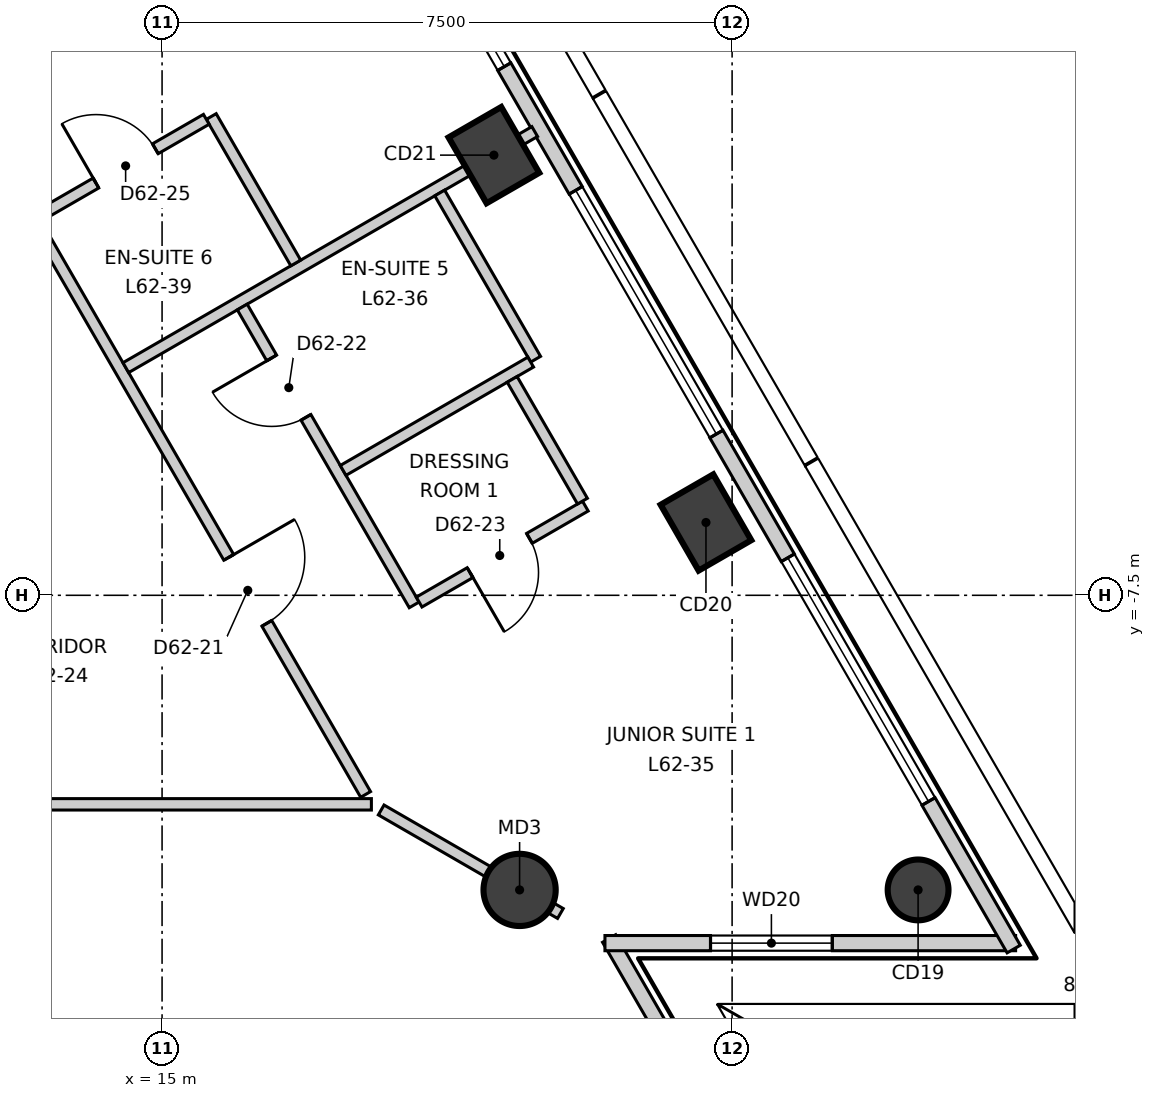
"""IFC4 building model, lengths in metres.
Left out: names, types, materials, properties, quantities, classifications, styles, units other than length and angle.
Written with IfcOpenShell. Run it as: python <this file> out.ifc"""

import sys

from ifc_helpers import new_model, si_unit, direction, frame, frame_2d, origin, origin_2d, place, context, subcontext, project, spatial, rectangle, circle, extrude, element, fill, save


model = new_model("IFC4")
c1 = context("Model", 3, precision=1e-05, world=origin(), true_north=direction((0.0, 1.0)))
c2 = subcontext(c1, "Body", "Model", "MODEL_VIEW")
j1 = project(units=[si_unit("LENGTHUNIT", "METRE"), si_unit("PLANEANGLEUNIT", "RADIAN")], contexts=[c1])
p1 = place(None, origin())
s1 = spatial("IfcSite", under=j1, at=p1, CompositionType="ELEMENT")
p2 = place(p1, origin())
s2 = spatial("IfcBuilding", under=s1, at=p2, CompositionType="ELEMENT")
p3 = place(p2, frame((0.0, 0.0, 268.3)))
s3 = spatial("IfcBuildingStorey", under=s2, at=p3, CompositionType="ELEMENT", Elevation=268.3)
p4 = place(p3, frame((24.947, -11.376, -0.3), z_axis=(0.0, 0.0, 1.0), x_axis=(-0.5, 0.866025403784, 0.0)))
e1 = element("IfcColumn", 1, at=p4, inside=s3, PredefinedType="COLUMN", context=c2, shape_type="SweptSolid", body=[
    extrude(circle(Radius=0.4, at=origin_2d()), origin(), (0.0, 0.0, 1.0), 3.6),
])
for number, where, z_axis, x_axis in (
    (2, (22.156, -6.542, -0.3), (0.0, 0.0, 1.0), (-0.5, 0.866, 0.0)),
    (3, (19.366, -1.709, -0.3), (0.0, 0.0, 1.0), (-0.5, 0.866, 0.0)),
):
    element("IfcColumn", number, at=place(p3, frame(where, z_axis=z_axis, x_axis=x_axis)), inside=s3, PredefinedType="COLUMN", context=c2, shape_type="SweptSolid", body=[
        extrude(rectangle(XDim=1.0, YDim=0.8, at=origin_2d()), origin(), (0.0, 0.0, 1.0), 3.6),
    ])
p5 = place(p3, frame((19.704, -11.376, -0.3), z_axis=(0.0, 0.0, 1.0), x_axis=(1.0, 0.0, 0.0)))
e4 = element("IfcColumn", 4, at=p5, inside=s3, PredefinedType="COLUMN", context=c2, shape_type="SweptSolid", body=[
    extrude(circle(Radius=0.475, at=origin_2d()), origin(), (0.0, 0.0, 1.0), 3.6),
])
p6 = place(p3, frame((23.584, -16.695, 0.0), z_axis=(0.0, 0.0, 1.0), x_axis=(-0.499972735707, 0.866041144259, 0.0)))
e5 = element("IfcWall", 5, at=p6, inside=s3, PredefinedType="ELEMENTEDWALL", context=c2, shape_type="SweptSolid", body=[
    extrude(rectangle(XDim=5.404, YDim=0.2, at=frame_2d((2.702, 0.0))), origin(), (0.0, 0.0, 1.0), 3.3),
])
p7 = place(p6, frame((1.99, 0.0, 0.9)))
e6 = element("IfcOpeningElement", 6, at=p7, cuts=e5, PredefinedType="OPENING", context=c2, shape_type="SweptSolid", body=[
    extrude(rectangle(XDim=1.6, YDim=2.2, at=frame_2d((0.8, 1.1))), frame((0.0, 0.11, 0.0), z_axis=(0.0, -1.0, 0.0), x_axis=(1.0, 0.0, 0.0)), (0.0, 0.0, 1.0), 0.22),
])
p8 = place(p3, frame((20.827, -12.076, 0.0), z_axis=(0.0, 0.0, 1.0), x_axis=(1.0, 0.0, 0.0)))
e7 = element("IfcWall", 7, at=p8, inside=s3, PredefinedType="ELEMENTEDWALL", context=c2, shape_type="SweptSolid", body=[
    extrude(rectangle(XDim=5.403, YDim=0.2, at=frame_2d((2.702, 0.0))), origin(), (0.0, 0.0, 1.0), 3.3),
])
p9 = place(p8, frame((1.39, 0.0, 0.9)))
e8 = element("IfcOpeningElement", 8, at=p9, cuts=e7, PredefinedType="OPENING", context=c2, shape_type="SweptSolid", body=[
    extrude(rectangle(XDim=1.6, YDim=2.2, at=frame_2d((0.8, 1.1))), frame((0.0, 0.11, 0.0), z_axis=(0.0, -1.0, 0.0), x_axis=(1.0, 0.0, 0.0)), (0.0, 0.0, 1.0), 0.22),
])
p10 = place(p3, frame((26.205, -12.154, 0.0), z_axis=(0.0, 0.0, 1.0), x_axis=(-0.49999909388, 0.866025926932, 0.0)))
e9 = element("IfcWall", 9, at=p10, inside=s3, PredefinedType="ELEMENTEDWALL", context=c2, shape_type="SweptSolid", body=[
    extrude(rectangle(XDim=47.236, YDim=0.2, at=frame_2d((23.618, 0.0))), origin(), (0.0, 0.0, 1.0), 3.3),
])
p11 = place(p10, frame((2.243, 0.0, 0.9)))
e10 = element("IfcOpeningElement", 10, at=p11, cuts=e9, PredefinedType="OPENING", context=c2, shape_type="SweptSolid", body=[
    extrude(rectangle(XDim=3.7, YDim=2.2, at=frame_2d((1.85, 1.1))), frame((0.0, 0.11, 0.0), z_axis=(0.0, -1.0, 0.0), x_axis=(1.0, 0.0, 0.0)), (0.0, 0.0, 1.0), 0.22),
])
p12 = place(p10, frame((7.825, 0.0, 0.9)))
e11 = element("IfcOpeningElement", 11, at=p12, cuts=e9, PredefinedType="OPENING", context=c2, shape_type="SweptSolid", body=[
    extrude(rectangle(XDim=3.7, YDim=2.2, at=frame_2d((1.85, 1.1))), frame((0.0, 0.11, 0.0), z_axis=(0.0, -1.0, 0.0), x_axis=(1.0, 0.0, 0.0)), (0.0, 0.0, 1.0), 0.22),
])
p13 = place(p10, frame((13.406, 0.0, 0.9)))
e12 = element("IfcOpeningElement", 12, at=p13, cuts=e9, PredefinedType="OPENING", context=c2, shape_type="SweptSolid", body=[
    extrude(rectangle(XDim=3.7, YDim=2.2, at=frame_2d((1.85, 1.1))), frame((0.0, 0.11, 0.0), z_axis=(0.0, -1.0, 0.0), x_axis=(1.0, 0.0, 0.0)), (0.0, 0.0, 1.0), 0.22),
])
p14 = place(p10, frame((18.987, 0.0, 0.9)))
e13 = element("IfcOpeningElement", 13, at=p14, cuts=e9, PredefinedType="OPENING", context=c2, shape_type="SweptSolid", body=[
    extrude(rectangle(XDim=3.7, YDim=2.2, at=frame_2d((1.85, 1.1))), frame((0.0, 0.11, 0.0), z_axis=(0.0, -1.0, 0.0), x_axis=(1.0, 0.0, 0.0)), (0.0, 0.0, 1.0), 0.22),
])
p15 = place(p10, frame((24.569, 0.0, 0.9)))
e14 = element("IfcOpeningElement", 14, at=p15, cuts=e9, PredefinedType="OPENING", context=c2, shape_type="SweptSolid", body=[
    extrude(rectangle(XDim=3.7, YDim=2.2, at=frame_2d((1.85, 1.1))), frame((0.0, 0.11, 0.0), z_axis=(0.0, -1.0, 0.0), x_axis=(1.0, 0.0, 0.0)), (0.0, 0.0, 1.0), 0.22),
])
p16 = place(p10, frame((30.15, 0.0, 0.9)))
e15 = element("IfcOpeningElement", 15, at=p16, cuts=e9, PredefinedType="OPENING", context=c2, shape_type="SweptSolid", body=[
    extrude(rectangle(XDim=3.7, YDim=2.2, at=frame_2d((1.85, 1.1))), frame((0.0, 0.11, 0.0), z_axis=(0.0, -1.0, 0.0), x_axis=(1.0, 0.0, 0.0)), (0.0, 0.0, 1.0), 0.22),
])
p17 = place(p10, frame((35.732, 0.0, 0.9)))
e16 = element("IfcOpeningElement", 16, at=p17, cuts=e9, PredefinedType="OPENING", context=c2, shape_type="SweptSolid", body=[
    extrude(rectangle(XDim=3.7, YDim=2.2, at=frame_2d((1.85, 1.1))), frame((0.0, 0.11, 0.0), z_axis=(0.0, -1.0, 0.0), x_axis=(1.0, 0.0, 0.0)), (0.0, 0.0, 1.0), 0.22),
])
p18 = place(p10, frame((41.313, 0.0, 0.9)))
e17 = element("IfcOpeningElement", 17, at=p18, cuts=e9, PredefinedType="OPENING", context=c2, shape_type="SweptSolid", body=[
    extrude(rectangle(XDim=3.7, YDim=2.2, at=frame_2d((1.85, 1.1))), frame((0.0, 0.11, 0.0), z_axis=(0.0, -1.0, 0.0), x_axis=(1.0, 0.0, 0.0)), (0.0, 0.0, 1.0), 0.22),
])
p19 = place(p3, frame((-17.604, -10.25, 0.0), z_axis=(0.0, 0.0, 1.0), x_axis=(1.0, 0.0, 0.0)))
e18 = element("IfcWall", 18, at=p19, inside=s3, PredefinedType="PARTITIONING", context=c2, shape_type="SweptSolid", body=[
    extrude(rectangle(XDim=35.358, YDim=0.15, at=frame_2d((17.679, 0.0))), origin(), (0.0, 0.0, 1.0), 3.3),
])
p20 = place(p19, frame((2.6, 0.0, 0.0)))
e19 = element("IfcOpeningElement", 19, at=p20, cuts=e18, PredefinedType="OPENING", context=c2, shape_type="SweptSolid", body=[
    extrude(rectangle(XDim=1.0, YDim=2.1, at=frame_2d((0.5, 1.05))), frame((0.0, 0.085, 0.0), z_axis=(0.0, -1.0, 0.0), x_axis=(1.0, 0.0, 0.0)), (0.0, 0.0, 1.0), 0.17),
])
p21 = place(p19, frame((8.391, 0.0, 0.0)))
e20 = element("IfcOpeningElement", 20, at=p21, cuts=e18, PredefinedType="OPENING", context=c2, shape_type="SweptSolid", body=[
    extrude(rectangle(XDim=1.0, YDim=2.1, at=frame_2d((0.5, 1.05))), frame((0.0, 0.085, 0.0), z_axis=(0.0, -1.0, 0.0), x_axis=(1.0, 0.0, 0.0)), (0.0, 0.0, 1.0), 0.17),
])
p22 = place(p19, frame((20.473, 0.0, 0.0)))
e21 = element("IfcOpeningElement", 21, at=p22, cuts=e18, PredefinedType="OPENING", context=c2, shape_type="SweptSolid", body=[
    extrude(rectangle(XDim=1.0, YDim=2.1, at=frame_2d((0.5, 1.05))), frame((0.0, 0.085, 0.0), z_axis=(0.0, -1.0, 0.0), x_axis=(1.0, 0.0, 0.0)), (0.0, 0.0, 1.0), 0.17),
])
p23 = place(p19, frame((14.973, 0.0, 0.0)))
e22 = element("IfcOpeningElement", 22, at=p23, cuts=e18, PredefinedType="OPENING", context=c2, shape_type="SweptSolid", body=[
    extrude(rectangle(XDim=0.9, YDim=2.1, at=frame_2d((0.45, 1.05))), frame((0.0, 0.085, 0.0), z_axis=(0.0, -1.0, 0.0), x_axis=(1.0, 0.0, 0.0)), (0.0, 0.0, 1.0), 0.17),
])
p24 = place(p19, frame((17.173, 0.0, 0.0)))
e23 = element("IfcOpeningElement", 23, at=p24, cuts=e18, PredefinedType="OPENING", context=c2, shape_type="SweptSolid", body=[
    extrude(rectangle(XDim=0.9, YDim=2.1, at=frame_2d((0.45, 1.05))), frame((0.0, 0.085, 0.0), z_axis=(0.0, -1.0, 0.0), x_axis=(1.0, 0.0, 0.0)), (0.0, 0.0, 1.0), 0.17),
])
p25 = place(p19, frame((28.735, 0.0, 0.0)))
e24 = element("IfcOpeningElement", 24, at=p25, cuts=e18, PredefinedType="OPENING", context=c2, shape_type="SweptSolid", body=[
    extrude(rectangle(XDim=1.0, YDim=2.1, at=frame_2d((0.5, 1.05))), frame((0.0, 0.085, 0.0), z_axis=(0.0, -1.0, 0.0), x_axis=(1.0, 0.0, 0.0)), (0.0, 0.0, 1.0), 0.17),
])
p26 = place(p3, frame((17.883, -10.324, 0.0), z_axis=(0.0, 0.0, 1.0), x_axis=(0.865910811146, -0.500198427768, 0.0)))
e25 = element("IfcWall", 25, at=p26, inside=s3, PredefinedType="PARTITIONING", context=c2, shape_type="SweptSolid", body=[
    extrude(rectangle(XDim=2.723, YDim=0.15, at=frame_2d((1.362, 0.0))), origin(), (0.0, 0.0, 1.0), 2.8),
])
p27 = place(p3, frame((0.075, 20.37, 0.0), z_axis=(0.0, 0.0, 1.0), x_axis=(0.499988971979, -0.866031770721, 0.0)))
e26 = element("IfcWall", 26, at=p27, inside=s3, PredefinedType="PARTITIONING", context=c2, shape_type="SweptSolid", body=[
    extrude(rectangle(XDim=35.207, YDim=0.15, at=frame_2d((17.604, 0.0))), origin(), (0.0, 0.0, 1.0), 3.3),
])
p28 = place(p27, frame((31.606, 0.0, 0.0)))
e27 = element("IfcOpeningElement", 27, at=p28, cuts=e26, PredefinedType="OPENING", context=c2, shape_type="SweptSolid", body=[
    extrude(rectangle(XDim=1.0, YDim=2.1, at=frame_2d((0.5, 1.05))), frame((0.0, 0.085, 0.0), z_axis=(0.0, -1.0, 0.0), x_axis=(1.0, 0.0, 0.0)), (0.0, 0.0, 1.0), 0.17),
])
p29 = place(p27, frame((24.316, 0.0, 0.0)))
e28 = element("IfcOpeningElement", 28, at=p29, cuts=e26, PredefinedType="OPENING", context=c2, shape_type="SweptSolid", body=[
    extrude(rectangle(XDim=1.0, YDim=2.1, at=frame_2d((0.5, 1.05))), frame((0.0, 0.085, 0.0), z_axis=(0.0, -1.0, 0.0), x_axis=(1.0, 0.0, 0.0)), (0.0, 0.0, 1.0), 0.17),
])
p30 = place(p27, frame((18.735, 0.0, 0.0)))
e29 = element("IfcOpeningElement", 29, at=p30, cuts=e26, PredefinedType="OPENING", context=c2, shape_type="SweptSolid", body=[
    extrude(rectangle(XDim=1.0, YDim=2.1, at=frame_2d((0.5, 1.05))), frame((0.0, 0.085, 0.0), z_axis=(0.0, -1.0, 0.0), x_axis=(1.0, 0.0, 0.0)), (0.0, 0.0, 1.0), 0.17),
])
p31 = place(p27, frame((8.154, 0.0, 0.0)))
e30 = element("IfcOpeningElement", 30, at=p31, cuts=e26, PredefinedType="OPENING", context=c2, shape_type="SweptSolid", body=[
    extrude(rectangle(XDim=1.0, YDim=2.1, at=frame_2d((0.5, 1.05))), frame((0.0, 0.085, 0.0), z_axis=(0.0, -1.0, 0.0), x_axis=(1.0, 0.0, 0.0)), (0.0, 0.0, 1.0), 0.17),
])
p32 = place(p27, frame((13.754, 0.0, 0.0)))
e31 = element("IfcOpeningElement", 31, at=p32, cuts=e26, PredefinedType="OPENING", context=c2, shape_type="SweptSolid", body=[
    extrude(rectangle(XDim=0.9, YDim=2.1, at=frame_2d((0.45, 1.05))), frame((0.0, 0.085, 0.0), z_axis=(0.0, -1.0, 0.0), x_axis=(1.0, 0.0, 0.0)), (0.0, 0.0, 1.0), 0.17),
])
p33 = place(p27, frame((11.554, 0.0, 0.0)))
e32 = element("IfcOpeningElement", 32, at=p33, cuts=e26, PredefinedType="OPENING", context=c2, shape_type="SweptSolid", body=[
    extrude(rectangle(XDim=0.9, YDim=2.1, at=frame_2d((0.45, 1.05))), frame((0.0, 0.085, 0.0), z_axis=(0.0, -1.0, 0.0), x_axis=(1.0, 0.0, 0.0)), (0.0, 0.0, 1.0), 0.17),
])
p34 = place(p27, frame((2.69, 0.0, 0.0)))
e33 = element("IfcOpeningElement", 33, at=p34, cuts=e26, PredefinedType="OPENING", context=c2, shape_type="SweptSolid", body=[
    extrude(rectangle(XDim=1.0, YDim=2.1, at=frame_2d((0.5, 1.05))), frame((0.0, 0.085, 0.0), z_axis=(0.0, -1.0, 0.0), x_axis=(1.0, 0.0, 0.0)), (0.0, 0.0, 1.0), 0.17),
])
p35 = place(p3, frame((14.523, -4.505, 0.0), z_axis=(0.0, 0.0, 1.0), x_axis=(0.866043575568, 0.499968524226, 0.0)))
e34 = element("IfcWall", 34, at=p35, inside=s3, PredefinedType="PARTITIONING", context=c2, shape_type="SweptSolid", body=[
    extrude(rectangle(XDim=6.212, YDim=0.15, at=frame_2d((3.106, 0.0))), origin(), (0.0, 0.0, 1.0), 3.3),
])
p36 = place(p3, frame((18.653, -2.207, 0.0), z_axis=(0.0, 0.0, 1.0), x_axis=(0.499789415832, -0.866146950478, 0.0)))
e35 = element("IfcWall", 35, at=p36, inside=s3, PredefinedType="PARTITIONING", context=c2, shape_type="SweptSolid", body=[
    extrude(rectangle(XDim=2.525, YDim=0.15, at=frame_2d((1.262, 0.0))), origin(), (0.0, 0.0, 1.0), 3.3),
])
p37 = place(p3, frame((16.055, -3.707, 0.0), z_axis=(0.0, 0.0, 1.0), x_axis=(0.499893710643, -0.866086761277, 0.0)))
e36 = element("IfcWall", 36, at=p37, inside=s3, PredefinedType="PARTITIONING", context=c2, shape_type="SweptSolid", body=[
    extrude(rectangle(XDim=4.525, YDim=0.15, at=frame_2d((2.262, 0.0))), origin(), (0.0, 0.0, 1.0), 3.3),
])
p38 = place(p37, frame((0.775, 0.0, 0.0)))
e37 = element("IfcOpeningElement", 37, at=p38, cuts=e36, PredefinedType="OPENING", context=c2, shape_type="SweptSolid", body=[
    extrude(rectangle(XDim=0.9, YDim=2.1, at=frame_2d((0.45, 1.05))), frame((0.0, 0.085, 0.0), z_axis=(0.0, -1.0, 0.0), x_axis=(1.0, 0.0, 0.0)), (0.0, 0.0, 1.0), 0.17),
])
p39 = place(p3, frame((15.647, -1.201, 0.0), z_axis=(0.0, 0.0, 1.0), x_axis=(0.499833278392, -0.866121639155, 0.0)))
e38 = element("IfcWall", 38, at=p39, inside=s3, PredefinedType="PARTITIONING", context=c2, shape_type="SweptSolid", body=[
    extrude(rectangle(XDim=2.225, YDim=0.15, at=frame_2d((1.112, 0.0))), origin(), (0.0, 0.0, 1.0), 3.3),
])
p40 = place(p3, frame((13.373, -2.513, 0.0), z_axis=(0.0, 0.0, 1.0), x_axis=(0.866102706185, 0.499866084405, 0.0)))
e39 = element("IfcWall", 39, at=p40, inside=s3, PredefinedType="PARTITIONING", context=c2, shape_type="SweptSolid", body=[
    extrude(rectangle(XDim=2.551, YDim=0.15, at=frame_2d((1.275, 0.0))), origin(), (0.0, 0.0, 1.0), 3.3),
])
p41 = place(p40, frame((0.875, 0.0, 0.0)))
e40 = element("IfcOpeningElement", 40, at=p41, cuts=e39, PredefinedType="OPENING", context=c2, shape_type="SweptSolid", body=[
    extrude(rectangle(XDim=0.9, YDim=2.1, at=frame_2d((0.45, 1.05))), frame((0.0, 0.085, 0.0), z_axis=(0.0, -1.0, 0.0), x_axis=(1.0, 0.0, 0.0)), (0.0, 0.0, 1.0), 0.17),
])
p42 = place(p3, frame((17.382, -5.857, 0.0), z_axis=(0.0, 0.0, 1.0), x_axis=(0.866004402611, 0.500036373335, 0.0)))
e41 = element("IfcWall", 41, at=p42, inside=s3, PredefinedType="PARTITIONING", context=c2, shape_type="SweptSolid", body=[
    extrude(rectangle(XDim=2.85, YDim=0.15, at=frame_2d((1.425, 0.0))), origin(), (0.0, 0.0, 1.0), 3.3),
])
p43 = place(p3, frame((18.382, -7.589, 0.0), z_axis=(0.0, 0.0, 1.0), x_axis=(0.86593764446, 0.500151972811, 0.0)))
e42 = element("IfcWall", 42, at=p43, inside=s3, PredefinedType="PARTITIONING", context=c2, shape_type="SweptSolid", body=[
    extrude(rectangle(XDim=2.526, YDim=0.15, at=frame_2d((1.263, 0.0))), origin(), (0.0, 0.0, 1.0), 3.3),
])
p44 = place(p43, frame((0.775, 0.0, 0.0)))
e43 = element("IfcOpeningElement", 43, at=p44, cuts=e42, PredefinedType="OPENING", context=c2, shape_type="SweptSolid", body=[
    extrude(rectangle(XDim=0.9, YDim=2.1, at=frame_2d((0.45, 1.05))), frame((0.0, 0.085, 0.0), z_axis=(0.0, -1.0, 0.0), x_axis=(1.0, 0.0, 0.0)), (0.0, 0.0, 1.0), 0.17),
])
p45 = place(p3, frame((19.606, -4.659, 0.0), z_axis=(0.0, 0.0, 1.0), x_axis=(0.500042316284, -0.866000971088, 0.0)))
e44 = element("IfcWall", 44, at=p45, inside=s3, PredefinedType="PARTITIONING", context=c2, shape_type="SweptSolid", body=[
    extrude(rectangle(XDim=1.85, YDim=0.15, at=frame_2d((0.925, 0.0))), origin(), (0.0, 0.0, 1.0), 3.3),
])
p46 = place(p9, origin())
e45 = element("IfcWindow", 45, at=p46, inside=s3, PartitioningType="SINGLE_PANEL", PredefinedType="WINDOW", context=c2, shape_type="SweptSolid", body=[
    extrude(rectangle(XDim=1.6, YDim=2.2, at=frame_2d((0.8, 1.1))), frame((0.0, 0.03, 0.0), z_axis=(0.0, -1.0, 0.0), x_axis=(1.0, 0.0, 0.0)), (0.0, 0.0, 1.0), 0.06),
])
fill(e8, e45)
p47 = place(p11, origin())
e46 = element("IfcWindow", 46, at=p47, inside=s3, PartitioningType="SINGLE_PANEL", PredefinedType="WINDOW", context=c2, shape_type="SweptSolid", body=[
    extrude(rectangle(XDim=3.7, YDim=2.2, at=frame_2d((1.85, 1.1))), frame((0.0, 0.03, 0.0), z_axis=(0.0, -1.0, 0.0), x_axis=(1.0, 0.0, 0.0)), (0.0, 0.0, 1.0), 0.06),
])
fill(e10, e46)
p48 = place(p12, origin())
e47 = element("IfcWindow", 47, at=p48, inside=s3, PartitioningType="SINGLE_PANEL", PredefinedType="WINDOW", context=c2, shape_type="SweptSolid", body=[
    extrude(rectangle(XDim=3.7, YDim=2.2, at=frame_2d((1.85, 1.1))), frame((0.0, 0.03, 0.0), z_axis=(0.0, -1.0, 0.0), x_axis=(1.0, 0.0, 0.0)), (0.0, 0.0, 1.0), 0.06),
])
fill(e11, e47)
p49 = place(p13, origin())
e48 = element("IfcWindow", 48, at=p49, inside=s3, PartitioningType="SINGLE_PANEL", PredefinedType="WINDOW", context=c2, shape_type="SweptSolid", body=[
    extrude(rectangle(XDim=3.7, YDim=2.2, at=frame_2d((1.85, 1.1))), frame((0.0, 0.03, 0.0), z_axis=(0.0, -1.0, 0.0), x_axis=(1.0, 0.0, 0.0)), (0.0, 0.0, 1.0), 0.06),
])
fill(e12, e48)
p50 = place(p28, origin())
e49 = element("IfcDoor", 49, at=p50, inside=s3, OperationType="SINGLE_SWING_RIGHT", PredefinedType="DOOR", context=c2, shape_type="SweptSolid", body=[
    extrude(rectangle(XDim=1.0, YDim=2.1, at=frame_2d((0.5, 1.05))), frame((0.0, 0.025, 0.0), z_axis=(0.0, -1.0, 0.0), x_axis=(1.0, 0.0, 0.0)), (0.0, 0.0, 1.0), 0.05),
])
fill(e27, e49)
p51 = place(p38, origin())
e50 = element("IfcDoor", 50, at=p51, inside=s3, OperationType="SINGLE_SWING_LEFT", PredefinedType="DOOR", context=c2, shape_type="SweptSolid", body=[
    extrude(rectangle(XDim=0.9, YDim=2.1, at=frame_2d((0.45, 1.05))), frame((0.0, 0.025, 0.0), z_axis=(0.0, -1.0, 0.0), x_axis=(1.0, 0.0, 0.0)), (0.0, 0.0, 1.0), 0.05),
])
fill(e37, e50)
p52 = place(p44, origin())
e51 = element("IfcDoor", 51, at=p52, inside=s3, OperationType="SINGLE_SWING_LEFT", PredefinedType="DOOR", context=c2, shape_type="SweptSolid", body=[
    extrude(rectangle(XDim=0.9, YDim=2.1, at=frame_2d((0.45, 1.05))), frame((0.0, 0.025, 0.0), z_axis=(0.0, -1.0, 0.0), x_axis=(1.0, 0.0, 0.0)), (0.0, 0.0, 1.0), 0.05),
])
fill(e43, e51)
p53 = place(p41, origin())
e52 = element("IfcDoor", 52, at=p53, inside=s3, OperationType="SINGLE_SWING_RIGHT", PredefinedType="DOOR", context=c2, shape_type="SweptSolid", body=[
    extrude(rectangle(XDim=0.9, YDim=2.1, at=frame_2d((0.45, 1.05))), frame((0.0, 0.025, 0.0), z_axis=(0.0, -1.0, 0.0), x_axis=(1.0, 0.0, 0.0)), (0.0, 0.0, 1.0), 0.05),
])
fill(e40, e52)
save(model, sys.argv[1])
